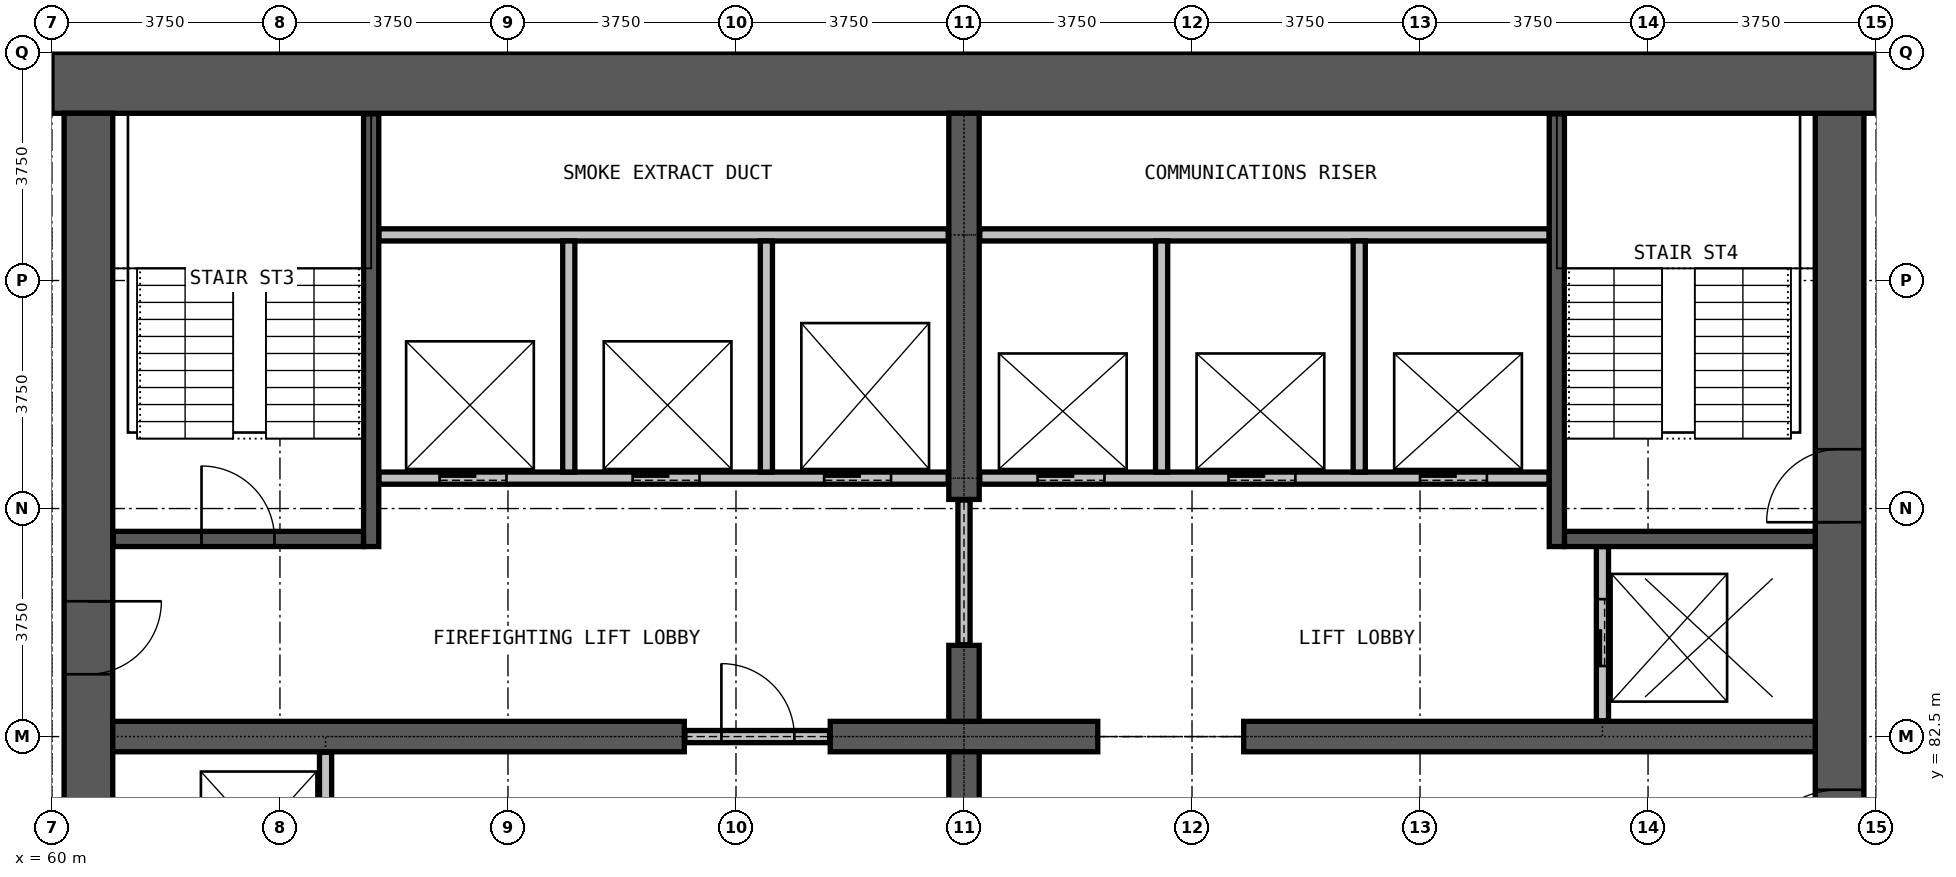
"""IFC4 building model, lengths in metres.
Left out: names, types, materials, properties, quantities, classifications, styles, units other than length and angle.
Written with IfcOpenShell. Run it as: python <this file> out.ifc"""

import sys

from ifc_helpers import new_model, si_unit, direction, frame, frame_2d, origin, place, context, subcontext, project, spatial, rectangle, extrude, element, fill, save


model = new_model("IFC4")
c1 = context("Model", 3, precision=1e-05, world=origin(), true_north=direction((0.0, 1.0)))
c2 = subcontext(c1, "Body", "Model", "MODEL_VIEW")
j1 = project(units=[si_unit("LENGTHUNIT", "METRE"), si_unit("PLANEANGLEUNIT", "RADIAN")], contexts=[c1])
p1 = place(None, origin())
s1 = spatial("IfcSite", under=j1, at=p1, CompositionType="ELEMENT")
p2 = place(p1, origin())
s2 = spatial("IfcBuilding", under=s1, at=p2, CompositionType="ELEMENT")
p3 = place(p2, frame((0.0, 0.0, 165.7)))
s3 = spatial("IfcBuildingStorey", under=s2, at=p3, CompositionType="ELEMENT", Elevation=165.7)
p4 = place(p3, frame((89.4, 72.25, 0.0), z_axis=(0.0, 0.0, 1.0), x_axis=(0.0, 1.0, 0.0)))
e1 = element("IfcWall", 1, at=p4, inside=s3, PredefinedType="SHEAR", context=c2, shape_type="SweptSolid", body=[
    extrude(rectangle(XDim=20.5, YDim=0.8, at=frame_2d((10.25, 0.0))), origin(), (0.0, 0.0, 1.0), 3.6),
])
p5 = place(p4, frame((0.275, 0.0, 0.0)))
e2 = element("IfcOpeningElement", 2, at=p5, cuts=e1, PredefinedType="OPENING", context=c2, shape_type="SweptSolid", body=[
    extrude(rectangle(XDim=1.2, YDim=2.2, at=frame_2d((0.6, 1.1))), frame((0.0, 0.41, 0.0), z_axis=(0.0, -1.0, 0.0), x_axis=(1.0, 0.0, 0.0)), (0.0, 0.0, 1.0), 0.82),
])
p6 = place(p4, frame((13.775, 0.0, 0.0)))
e3 = element("IfcOpeningElement", 3, at=p6, cuts=e1, PredefinedType="OPENING", context=c2, shape_type="SweptSolid", body=[
    extrude(rectangle(XDim=1.2, YDim=2.2, at=frame_2d((0.6, 1.1))), frame((0.0, 0.41, 0.0), z_axis=(0.0, -1.0, 0.0), x_axis=(1.0, 0.0, 0.0)), (0.0, 0.0, 1.0), 0.82),
])
p7 = place(p4, frame((7.875, 0.0, 0.0)))
e4 = element("IfcOpeningElement", 4, at=p7, cuts=e1, PredefinedType="OPENING", context=c2, shape_type="SweptSolid", body=[
    extrude(rectangle(XDim=1.5, YDim=2.2, at=frame_2d((0.75, 1.1))), frame((0.0, 0.41, 0.0), z_axis=(0.0, -1.0, 0.0), x_axis=(1.0, 0.0, 0.0)), (0.0, 0.0, 1.0), 0.82),
])
p8 = place(p3, frame((90.0, 93.25, 0.0), z_axis=(0.0, 0.0, 1.0), x_axis=(-1.0, 0.0, 0.0)))
e5 = element("IfcWall", 5, at=p8, inside=s3, PredefinedType="SHEAR", context=c2, shape_type="SweptSolid", body=[
    extrude(rectangle(XDim=30.0, YDim=1.0, at=frame_2d((15.0, 0.0))), origin(), (0.0, 0.0, 1.0), 3.6),
])
p9 = place(p3, frame((60.6, 92.75, 0.0), z_axis=(0.0, 0.0, 1.0), x_axis=(0.0, -1.0, 0.0)))
e6 = element("IfcWall", 6, at=p9, inside=s3, PredefinedType="SHEAR", context=c2, shape_type="SweptSolid", body=[
    extrude(rectangle(XDim=20.5, YDim=0.8, at=frame_2d((10.25, 0.0))), origin(), (0.0, 0.0, 1.0), 3.6),
])
p10 = place(p9, frame((19.025, 0.0, 0.0)))
e7 = element("IfcOpeningElement", 7, at=p10, cuts=e6, PredefinedType="OPENING", context=c2, shape_type="SweptSolid", body=[
    extrude(rectangle(XDim=1.2, YDim=2.2, at=frame_2d((0.6, 1.1))), frame((0.0, 0.41, 0.0), z_axis=(0.0, -1.0, 0.0), x_axis=(1.0, 0.0, 0.0)), (0.0, 0.0, 1.0), 0.82),
])
p11 = place(p9, frame((8.025, 0.0, 0.0)))
e8 = element("IfcOpeningElement", 8, at=p11, cuts=e6, PredefinedType="OPENING", context=c2, shape_type="SweptSolid", body=[
    extrude(rectangle(XDim=1.2, YDim=2.2, at=frame_2d((0.6, 1.1))), frame((0.0, 0.41, 0.0), z_axis=(0.0, -1.0, 0.0), x_axis=(1.0, 0.0, 0.0)), (0.0, 0.0, 1.0), 0.82),
])
p12 = place(p3, frame((61.0, 82.5, 0.0), z_axis=(0.0, 0.0, 1.0), x_axis=(1.0, 0.0, 0.0)))
e9 = element("IfcWall", 9, at=p12, inside=s3, PredefinedType="SHEAR", context=c2, shape_type="SweptSolid", body=[
    extrude(rectangle(XDim=9.4, YDim=0.5, at=frame_2d((4.7, 0.0))), origin(), (0.0, 0.0, 1.0), 3.6),
])
p13 = place(p3, frame((72.8, 82.5, 0.0), z_axis=(0.0, 0.0, 1.0), x_axis=(1.0, 0.0, 0.0)))
e10 = element("IfcWall", 10, at=p13, inside=s3, PredefinedType="SHEAR", context=c2, shape_type="SweptSolid", body=[
    extrude(rectangle(XDim=4.4, YDim=0.5, at=frame_2d((2.2, 0.0))), origin(), (0.0, 0.0, 1.0), 3.6),
])
p14 = place(p3, frame((79.6, 82.5, 0.0), z_axis=(0.0, 0.0, 1.0), x_axis=(1.0, 0.0, 0.0)))
e11 = element("IfcWall", 11, at=p14, inside=s3, PredefinedType="SHEAR", context=c2, shape_type="SweptSolid", body=[
    extrude(rectangle(XDim=9.4, YDim=0.5, at=frame_2d((4.7, 0.0))), origin(), (0.0, 0.0, 1.0), 3.6),
])
for number, where, z_axis, x_axis in (
    (12, (75.0, 81.0, 0.0), (0.0, 0.0, 1.0), (0.0, 1.0, 0.0)),
    (13, (75.0, 82.75, 0.0), (0.0, 0.0, 1.0), (0.0, 1.0, 0.0)),
):
    element("IfcWall", number, at=place(p3, frame(where, z_axis=z_axis, x_axis=x_axis)), inside=s3, PredefinedType="SHEAR", context=c2, shape_type="SweptSolid", body=[
        extrude(rectangle(XDim=1.25, YDim=0.5, at=frame_2d((0.625, 0.0))), origin(), (0.0, 0.0, 1.0), 3.6),
    ])
p15 = place(p3, frame((75.0, 86.4, 0.0), z_axis=(0.0, 0.0, 1.0), x_axis=(0.0, 1.0, 0.0)))
e14 = element("IfcWall", 14, at=p15, inside=s3, PredefinedType="SHEAR", context=c2, shape_type="SweptSolid", body=[
    extrude(rectangle(XDim=6.35, YDim=0.5, at=frame_2d((3.175, 0.0))), origin(), (0.0, 0.0, 1.0), 3.6),
])
p16 = place(p3, frame((70.41, 82.5, 0.0), z_axis=(0.0, 0.0, 1.0), x_axis=(1.0, 0.0, 0.0)))
e15 = element("IfcWall", 15, at=p16, inside=s3, PredefinedType="PARTITIONING", context=c2, shape_type="SweptSolid", body=[
    extrude(rectangle(XDim=2.38, YDim=0.2, at=frame_2d((1.19, 0.0))), origin(), (0.0, 0.0, 1.0), 2.4),
])
p17 = place(p16, frame((0.6, 0.0, 0.0)))
e16 = element("IfcOpeningElement", 16, at=p17, cuts=e15, PredefinedType="OPENING", context=c2, shape_type="SweptSolid", body=[
    extrude(rectangle(XDim=1.2, YDim=2.2, at=frame_2d((0.6, 1.1))), frame((0.0, 0.11, 0.0), z_axis=(0.0, -1.0, 0.0), x_axis=(1.0, 0.0, 0.0)), (0.0, 0.0, 1.0), 0.22),
])
p18 = place(p3, frame((75.0, 84.01, 0.0), z_axis=(0.0, 0.0, 1.0), x_axis=(0.0, 1.0, 0.0)))
e17 = element("IfcWall", 17, at=p18, inside=s3, PredefinedType="PARTITIONING", context=c2, shape_type="SweptSolid", body=[
    extrude(rectangle(XDim=2.38, YDim=0.2, at=frame_2d((1.19, 0.0))), origin(), (0.0, 0.0, 1.0), 2.4),
])
p19 = place(p3, frame((65.375, 86.75, 0.0), z_axis=(0.0, 0.0, 1.0), x_axis=(1.0, 0.0, 0.0)))
e18 = element("IfcWall", 18, at=p19, inside=s3, PredefinedType="PARTITIONING", context=c2, shape_type="SweptSolid", body=[
    extrude(rectangle(XDim=9.365, YDim=0.2, at=frame_2d((4.683, 0.0))), origin(), (0.0, 0.0, 1.0), 3.3),
])
p20 = place(p19, frame((1.0, 0.0, 0.0)))
e19 = element("IfcOpeningElement", 19, at=p20, cuts=e18, PredefinedType="OPENING", context=c2, shape_type="SweptSolid", body=[
    extrude(rectangle(XDim=1.1, YDim=2.2, at=frame_2d((0.55, 1.1))), frame((0.0, 0.11, 0.0), z_axis=(0.0, -1.0, 0.0), x_axis=(1.0, 0.0, 0.0)), (0.0, 0.0, 1.0), 0.22),
])
p21 = place(p19, frame((4.175, 0.0, 0.0)))
e20 = element("IfcOpeningElement", 20, at=p21, cuts=e18, PredefinedType="OPENING", context=c2, shape_type="SweptSolid", body=[
    extrude(rectangle(XDim=1.1, YDim=2.2, at=frame_2d((0.55, 1.1))), frame((0.0, 0.11, 0.0), z_axis=(0.0, -1.0, 0.0), x_axis=(1.0, 0.0, 0.0)), (0.0, 0.0, 1.0), 0.22),
])
p22 = place(p19, frame((7.325, 0.0, 0.0)))
e21 = element("IfcOpeningElement", 21, at=p22, cuts=e18, PredefinedType="OPENING", context=c2, shape_type="SweptSolid", body=[
    extrude(rectangle(XDim=1.1, YDim=2.2, at=frame_2d((0.55, 1.1))), frame((0.0, 0.11, 0.0), z_axis=(0.0, -1.0, 0.0), x_axis=(1.0, 0.0, 0.0)), (0.0, 0.0, 1.0), 0.22),
])
p23 = place(p3, frame((75.26, 86.75, 0.0), z_axis=(0.0, 0.0, 1.0), x_axis=(1.0, 0.0, 0.0)))
e22 = element("IfcWall", 22, at=p23, inside=s3, PredefinedType="PARTITIONING", context=c2, shape_type="SweptSolid", body=[
    extrude(rectangle(XDim=9.365, YDim=0.2, at=frame_2d((4.683, 0.0))), origin(), (0.0, 0.0, 1.0), 3.3),
])
p24 = place(p23, frame((0.95, 0.0, 0.0)))
e23 = element("IfcOpeningElement", 23, at=p24, cuts=e22, PredefinedType="OPENING", context=c2, shape_type="SweptSolid", body=[
    extrude(rectangle(XDim=1.1, YDim=2.2, at=frame_2d((0.55, 1.1))), frame((0.0, 0.11, 0.0), z_axis=(0.0, -1.0, 0.0), x_axis=(1.0, 0.0, 0.0)), (0.0, 0.0, 1.0), 0.22),
])
p25 = place(p23, frame((4.09, 0.0, 0.0)))
e24 = element("IfcOpeningElement", 24, at=p25, cuts=e22, PredefinedType="OPENING", context=c2, shape_type="SweptSolid", body=[
    extrude(rectangle(XDim=1.1, YDim=2.2, at=frame_2d((0.55, 1.1))), frame((0.0, 0.11, 0.0), z_axis=(0.0, -1.0, 0.0), x_axis=(1.0, 0.0, 0.0)), (0.0, 0.0, 1.0), 0.22),
])
p26 = place(p23, frame((7.24, 0.0, 0.0)))
e25 = element("IfcOpeningElement", 25, at=p26, cuts=e22, PredefinedType="OPENING", context=c2, shape_type="SweptSolid", body=[
    extrude(rectangle(XDim=1.1, YDim=2.2, at=frame_2d((0.55, 1.1))), frame((0.0, 0.11, 0.0), z_axis=(0.0, -1.0, 0.0), x_axis=(1.0, 0.0, 0.0)), (0.0, 0.0, 1.0), 0.22),
])
for number, where, z_axis, x_axis in (
    (26, (65.375, 90.75, 0.0), (0.0, 0.0, 1.0), (1.0, 0.0, 0.0)),
    (27, (75.26, 90.75, 0.0), (0.0, 0.0, 1.0), (1.0, 0.0, 0.0)),
):
    element("IfcWall", number, at=place(p3, frame(where, z_axis=z_axis, x_axis=x_axis)), inside=s3, PredefinedType="PARTITIONING", context=c2, shape_type="SweptSolid", body=[
        extrude(rectangle(XDim=9.365, YDim=0.2, at=frame_2d((4.683, 0.0))), origin(), (0.0, 0.0, 1.0), 3.3),
    ])
p27 = place(p3, frame((64.5, 79.375, 0.0), z_axis=(0.0, 0.0, 1.0), x_axis=(0.0, 1.0, 0.0)))
e28 = element("IfcWall", 28, at=p27, inside=s3, PredefinedType="PARTITIONING", context=c2, shape_type="SweptSolid", body=[
    extrude(rectangle(XDim=2.865, YDim=0.2, at=frame_2d((1.433, 0.0))), origin(), (0.0, 0.0, 1.0), 3.3),
])
for number, where, z_axis, x_axis in (
    (29, (68.5, 86.85, 0.0), (0.0, 0.0, 1.0), (0.0, 1.0, 0.0)),
    (30, (71.75, 86.85, 0.0), (0.0, 0.0, 1.0), (0.0, 1.0, 0.0)),
    (31, (78.25, 86.85, 0.0), (0.0, 0.0, 1.0), (0.0, 1.0, 0.0)),
    (32, (81.5, 86.85, 0.0), (0.0, 0.0, 1.0), (0.0, 1.0, 0.0)),
):
    element("IfcWall", number, at=place(p3, frame(where, z_axis=z_axis, x_axis=x_axis)), inside=s3, PredefinedType="PARTITIONING", context=c2, shape_type="SweptSolid", body=[
        extrude(rectangle(XDim=3.8, YDim=0.2, at=frame_2d((1.9, 0.0))), origin(), (0.0, 0.0, 1.0), 3.3),
    ])
p28 = place(p3, frame((85.5, 82.76, 0.0), z_axis=(0.0, 0.0, 1.0), x_axis=(0.0, 1.0, 0.0)))
e33 = element("IfcWall", 33, at=p28, inside=s3, PredefinedType="PARTITIONING", context=c2, shape_type="SweptSolid", body=[
    extrude(rectangle(XDim=2.865, YDim=0.2, at=frame_2d((1.433, 0.0))), origin(), (0.0, 0.0, 1.0), 3.3),
])
p29 = place(p28, frame((0.9, 0.0, 0.0)))
e34 = element("IfcOpeningElement", 34, at=p29, cuts=e33, PredefinedType="OPENING", context=c2, shape_type="SweptSolid", body=[
    extrude(rectangle(XDim=1.1, YDim=2.2, at=frame_2d((0.55, 1.1))), frame((0.0, 0.11, 0.0), z_axis=(0.0, -1.0, 0.0), x_axis=(1.0, 0.0, 0.0)), (0.0, 0.0, 1.0), 0.22),
])
p30 = place(p3, frame((61.01, 85.75, 0.0), z_axis=(0.0, 0.0, 1.0), x_axis=(1.0, 0.0, 0.0)))
e35 = element("IfcWall", 35, at=p30, inside=s3, PredefinedType="PARTITIONING", context=c2, shape_type="SweptSolid", body=[
    extrude(rectangle(XDim=4.115, YDim=0.25, at=frame_2d((2.058, 0.0))), origin(), (0.0, 0.0, 1.0), 3.3),
])
p31 = place(p30, frame((1.45, 0.0, 0.0)))
e36 = element("IfcOpeningElement", 36, at=p31, cuts=e35, PredefinedType="OPENING", context=c2, shape_type="SweptSolid", body=[
    extrude(rectangle(XDim=1.2, YDim=2.2, at=frame_2d((0.6, 1.1))), frame((0.0, 0.135, 0.0), z_axis=(0.0, -1.0, 0.0), x_axis=(1.0, 0.0, 0.0)), (0.0, 0.0, 1.0), 0.27),
])
p32 = place(p3, frame((84.875, 85.75, 0.0), z_axis=(0.0, 0.0, 1.0), x_axis=(1.0, 0.0, 0.0)))
e37 = element("IfcWall", 37, at=p32, inside=s3, PredefinedType="PARTITIONING", context=c2, shape_type="SweptSolid", body=[
    extrude(rectangle(XDim=4.125, YDim=0.25, at=frame_2d((2.062, 0.0))), origin(), (0.0, 0.0, 1.0), 3.3),
])
for number, where, z_axis, x_axis in (
    (38, (65.25, 85.625, 0.0), (0.0, 0.0, 1.0), (0.0, 1.0, 0.0)),
    (39, (84.75, 85.625, 0.0), (0.0, 0.0, 1.0), (0.0, 1.0, 0.0)),
):
    element("IfcWall", number, at=place(p3, frame(where, z_axis=z_axis, x_axis=x_axis)), inside=s3, PredefinedType="PARTITIONING", context=c2, shape_type="SweptSolid", body=[
        extrude(rectangle(XDim=7.115, YDim=0.25, at=frame_2d((3.558, 0.0))), origin(), (0.0, 0.0, 1.0), 3.3),
    ])
p33 = place(p24, origin())
e40 = element("IfcDoor", 40, at=p33, inside=s3, OperationType="DOUBLE_DOOR_SLIDING", PredefinedType="DOOR", context=c2, shape_type="SweptSolid", body=[
    extrude(rectangle(XDim=1.1, YDim=2.2, at=frame_2d((0.55, 1.1))), frame((0.0, 0.025, 0.0), z_axis=(0.0, -1.0, 0.0), x_axis=(1.0, 0.0, 0.0)), (0.0, 0.0, 1.0), 0.05),
])
fill(e23, e40)
p34 = place(p25, origin())
e41 = element("IfcDoor", 41, at=p34, inside=s3, OperationType="DOUBLE_DOOR_SLIDING", PredefinedType="DOOR", context=c2, shape_type="SweptSolid", body=[
    extrude(rectangle(XDim=1.1, YDim=2.2, at=frame_2d((0.55, 1.1))), frame((0.0, 0.025, 0.0), z_axis=(0.0, -1.0, 0.0), x_axis=(1.0, 0.0, 0.0)), (0.0, 0.0, 1.0), 0.05),
])
fill(e24, e41)
p35 = place(p26, origin())
e42 = element("IfcDoor", 42, at=p35, inside=s3, OperationType="DOUBLE_DOOR_SLIDING", PredefinedType="DOOR", context=c2, shape_type="SweptSolid", body=[
    extrude(rectangle(XDim=1.1, YDim=2.2, at=frame_2d((0.55, 1.1))), frame((0.0, 0.025, 0.0), z_axis=(0.0, -1.0, 0.0), x_axis=(1.0, 0.0, 0.0)), (0.0, 0.0, 1.0), 0.05),
])
fill(e25, e42)
p36 = place(p20, origin())
e43 = element("IfcDoor", 43, at=p36, inside=s3, OperationType="DOUBLE_DOOR_SLIDING", PredefinedType="DOOR", context=c2, shape_type="SweptSolid", body=[
    extrude(rectangle(XDim=1.1, YDim=2.2, at=frame_2d((0.55, 1.1))), frame((0.0, 0.025, 0.0), z_axis=(0.0, -1.0, 0.0), x_axis=(1.0, 0.0, 0.0)), (0.0, 0.0, 1.0), 0.05),
])
fill(e19, e43)
p37 = place(p21, origin())
e44 = element("IfcDoor", 44, at=p37, inside=s3, OperationType="DOUBLE_DOOR_SLIDING", PredefinedType="DOOR", context=c2, shape_type="SweptSolid", body=[
    extrude(rectangle(XDim=1.1, YDim=2.2, at=frame_2d((0.55, 1.1))), frame((0.0, 0.025, 0.0), z_axis=(0.0, -1.0, 0.0), x_axis=(1.0, 0.0, 0.0)), (0.0, 0.0, 1.0), 0.05),
])
fill(e20, e44)
p38 = place(p22, origin())
e45 = element("IfcDoor", 45, at=p38, inside=s3, OperationType="DOUBLE_DOOR_SLIDING", PredefinedType="DOOR", context=c2, shape_type="SweptSolid", body=[
    extrude(rectangle(XDim=1.1, YDim=2.2, at=frame_2d((0.55, 1.1))), frame((0.0, 0.025, 0.0), z_axis=(0.0, -1.0, 0.0), x_axis=(1.0, 0.0, 0.0)), (0.0, 0.0, 1.0), 0.05),
])
fill(e21, e45)
p39 = place(p29, origin())
e46 = element("IfcDoor", 46, at=p39, inside=s3, OperationType="DOUBLE_DOOR_SLIDING", PredefinedType="DOOR", context=c2, shape_type="SweptSolid", body=[
    extrude(rectangle(XDim=1.1, YDim=2.2, at=frame_2d((0.55, 1.1))), frame((0.0, 0.025, 0.0), z_axis=(0.0, -1.0, 0.0), x_axis=(1.0, 0.0, 0.0)), (0.0, 0.0, 1.0), 0.05),
])
fill(e34, e46)
p40 = place(p17, origin())
e47 = element("IfcDoor", 47, at=p40, inside=s3, OperationType="SINGLE_SWING_LEFT", PredefinedType="DOOR", context=c2, shape_type="SweptSolid", body=[
    extrude(rectangle(XDim=1.2, YDim=2.2, at=frame_2d((0.6, 1.1))), frame((0.0, 0.025, 0.0), z_axis=(0.0, -1.0, 0.0), x_axis=(1.0, 0.0, 0.0)), (0.0, 0.0, 1.0), 0.05),
])
fill(e16, e47)
p41 = place(p31, origin())
e48 = element("IfcDoor", 48, at=p41, inside=s3, OperationType="SINGLE_SWING_LEFT", PredefinedType="DOOR", context=c2, shape_type="SweptSolid", body=[
    extrude(rectangle(XDim=1.2, YDim=2.2, at=frame_2d((0.6, 1.1))), frame((0.0, 0.025, 0.0), z_axis=(0.0, -1.0, 0.0), x_axis=(1.0, 0.0, 0.0)), (0.0, 0.0, 1.0), 0.05),
])
fill(e36, e48)
p42 = place(p6, origin())
e49 = element("IfcDoor", 49, at=p42, inside=s3, OperationType="SINGLE_SWING_LEFT", PredefinedType="DOOR", context=c2, shape_type="SweptSolid", body=[
    extrude(rectangle(XDim=1.2, YDim=2.2, at=frame_2d((0.6, 1.1))), frame((0.0, 0.025, 0.0), z_axis=(0.0, -1.0, 0.0), x_axis=(1.0, 0.0, 0.0)), (0.0, 0.0, 1.0), 0.05),
])
fill(e3, e49)
p43 = place(p7, origin())
e50 = element("IfcDoor", 50, at=p43, inside=s3, OperationType="DOUBLE_DOOR_SINGLE_SWING", PredefinedType="DOOR", context=c2, shape_type="SweptSolid", body=[
    extrude(rectangle(XDim=1.5, YDim=2.2, at=frame_2d((0.75, 1.1))), frame((0.0, 0.025, 0.0), z_axis=(0.0, -1.0, 0.0), x_axis=(1.0, 0.0, 0.0)), (0.0, 0.0, 1.0), 0.05),
])
fill(e4, e50)
p44 = place(p11, origin())
e51 = element("IfcDoor", 51, at=p44, inside=s3, OperationType="SINGLE_SWING_LEFT", PredefinedType="DOOR", context=c2, shape_type="SweptSolid", body=[
    extrude(rectangle(XDim=1.2, YDim=2.2, at=frame_2d((0.6, 1.1))), frame((0.0, 0.025, 0.0), z_axis=(0.0, -1.0, 0.0), x_axis=(1.0, 0.0, 0.0)), (0.0, 0.0, 1.0), 0.05),
])
fill(e8, e51)
save(model, sys.argv[1])
